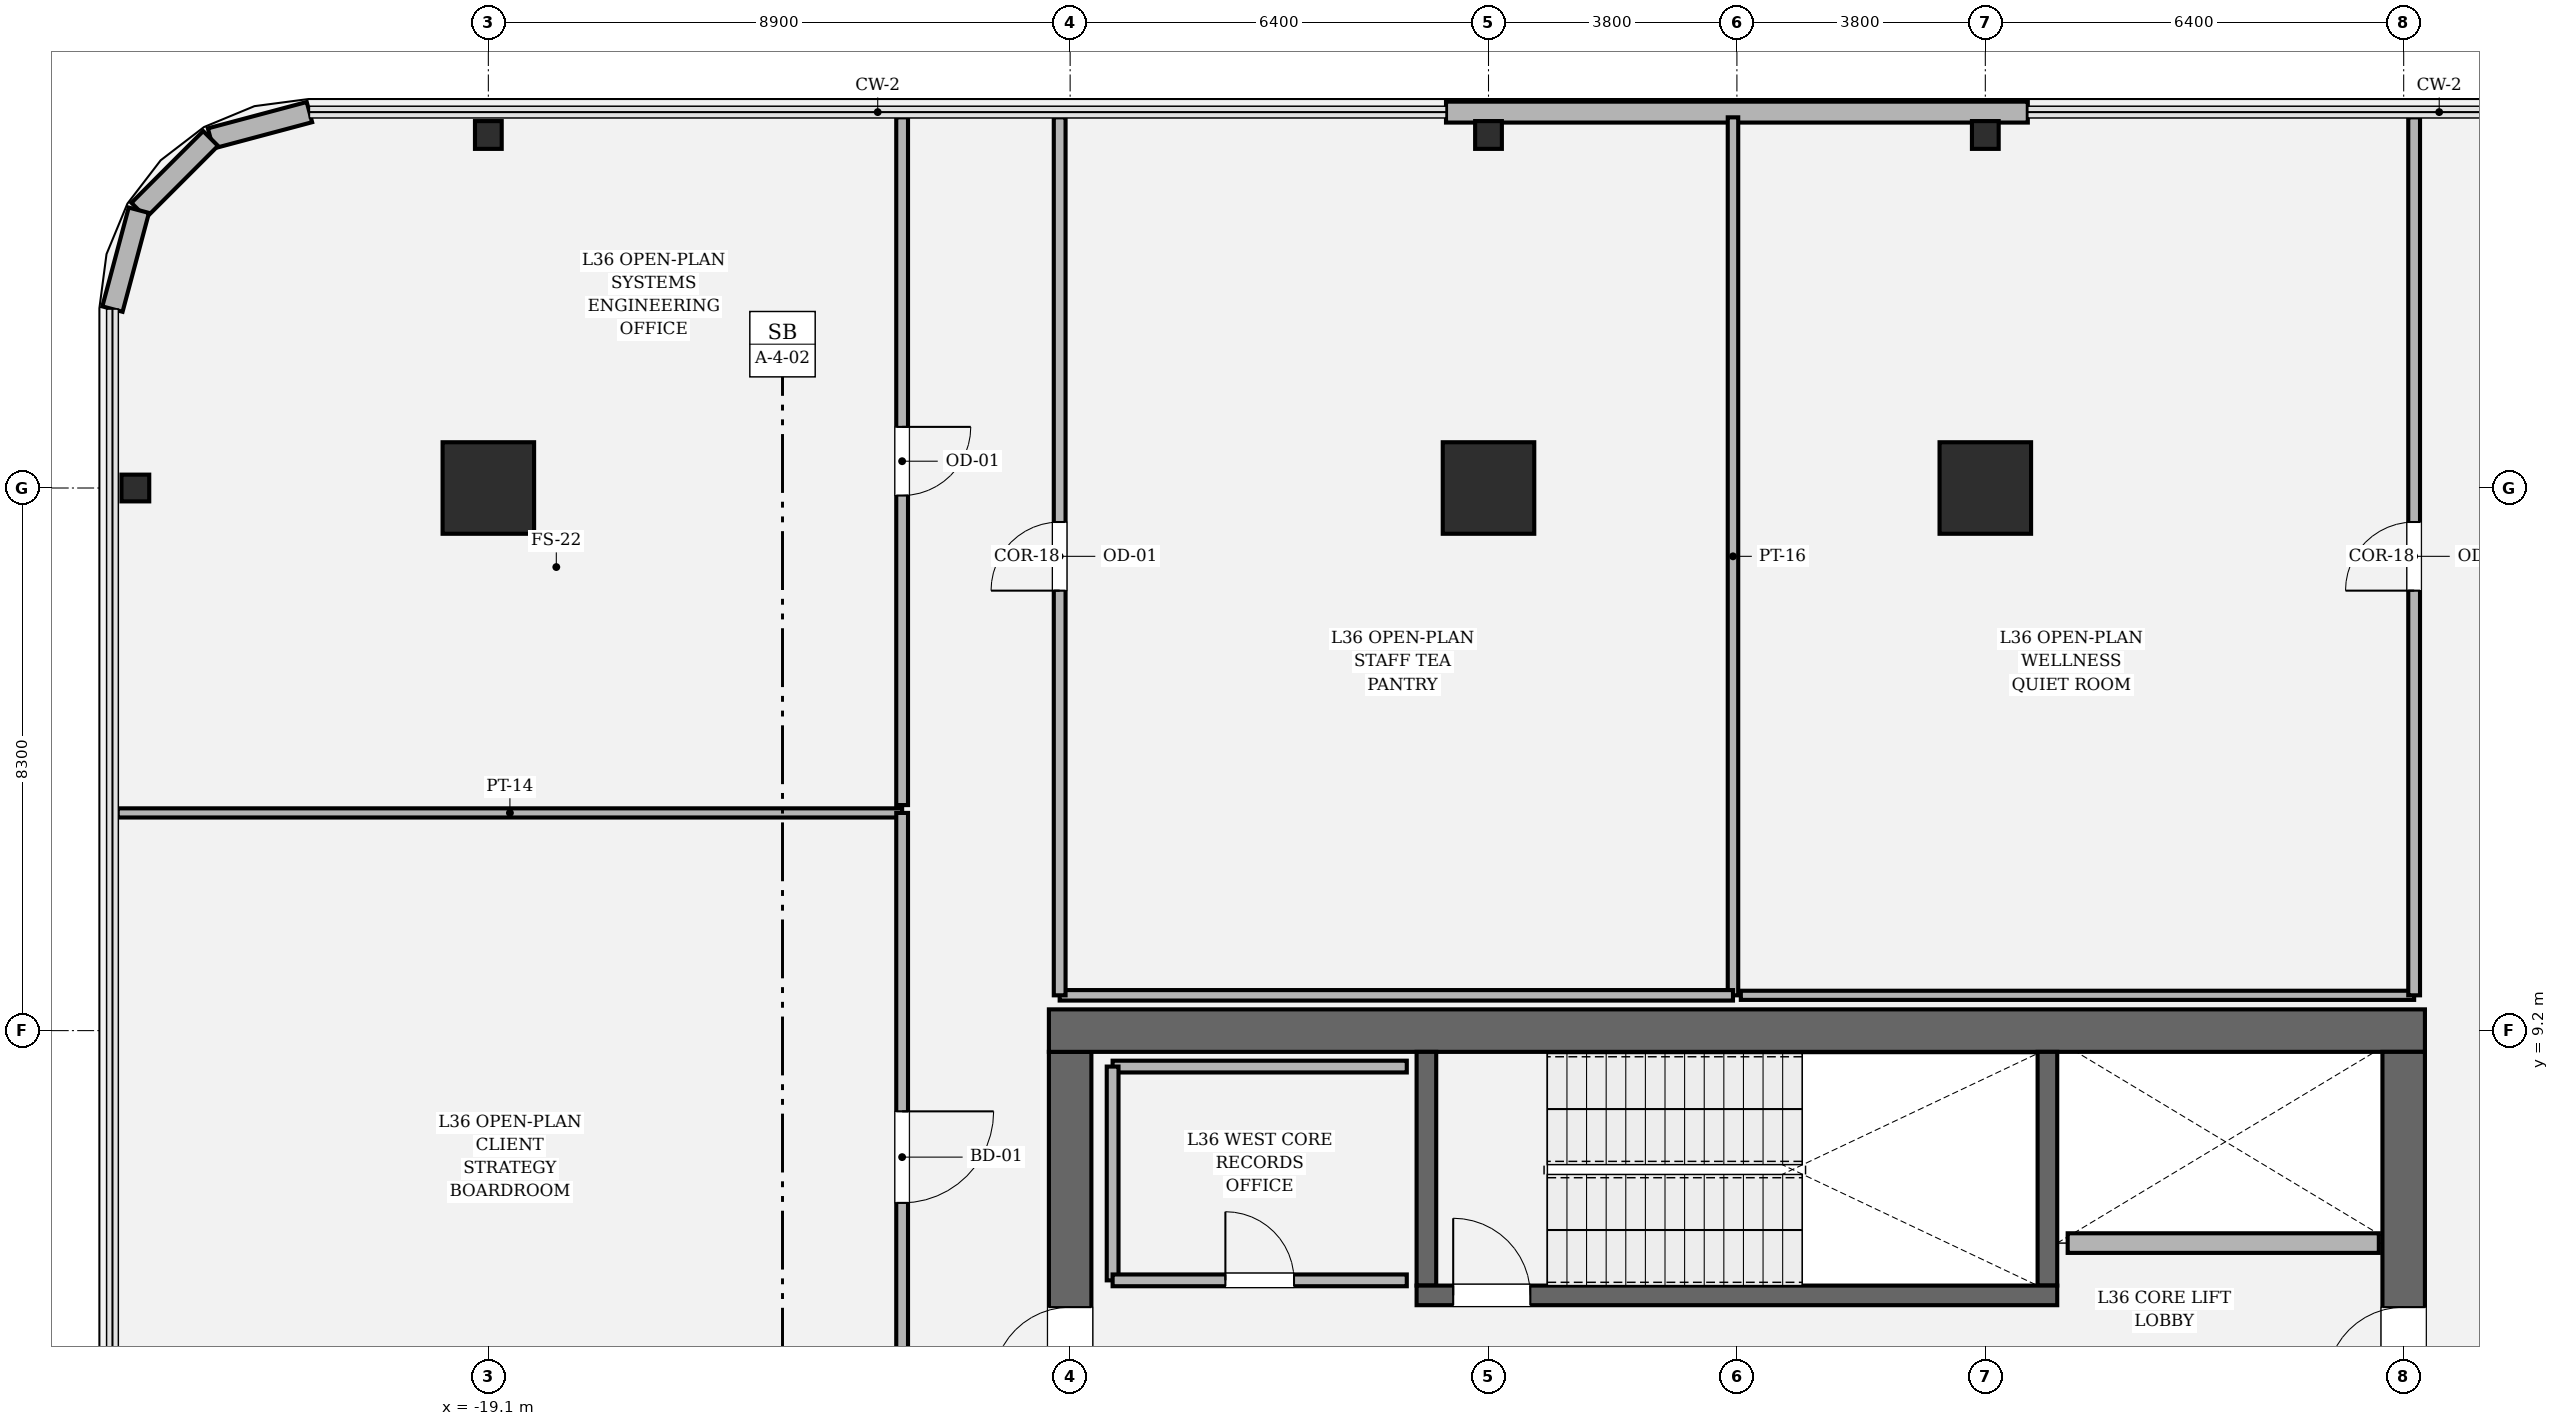
"""IFC4 building model, lengths in metres.
Left out: names, types, materials, properties, quantities, classifications, styles, units other than length and angle.
Written with IfcOpenShell. Run it as: python <this file> out.ifc"""

import sys

from ifc_helpers import new_model, si_unit, direction, frame, frame_2d, origin, origin_2d, place, context, subcontext, project, spatial, rectangle, hollow_rectangle, i_section, extrude, element, fill, save


model = new_model("IFC4")
c1 = context("Model", 3, precision=1e-05, world=origin(), true_north=direction((0.0, 1.0)))
c2 = subcontext(c1, "Body", "Model", "MODEL_VIEW")
j1 = project(units=[si_unit("LENGTHUNIT", "METRE"), si_unit("PLANEANGLEUNIT", "RADIAN")], contexts=[c1])
p1 = place(None, origin())
s1 = spatial("IfcSite", under=j1, at=p1, CompositionType="ELEMENT")
p2 = place(p1, origin())
s2 = spatial("IfcBuilding", under=s1, at=p2, CompositionType="ELEMENT")
p3 = place(p2, frame((0.0, 0.0, 156.0)))
s3 = spatial("IfcBuildingStorey", under=s2, at=p3, CompositionType="ELEMENT", Elevation=156.0)
p4 = place(p3, frame((-10.2, -8.875, 0.0), z_axis=(0.0, 0.0, 1.0), x_axis=(0.0, 1.0, 0.0)))
e1 = element("IfcWall", 1, at=p4, inside=s3, PredefinedType="SHEAR", context=c2, shape_type="SweptSolid", body=[
    extrude(rectangle(XDim=17.75, YDim=0.65, at=frame_2d((8.875, 0.0))), origin(), (0.0, 0.0, 1.0), 4.05),
])
p5 = place(p4, frame((12.665, 0.0, 0.0)))
e2 = element("IfcOpeningElement", 2, at=p5, cuts=e1, PredefinedType="OPENING", context=c2, shape_type="SweptSolid", body=[
    extrude(rectangle(XDim=1.18, YDim=2.2, at=frame_2d((0.59, 1.1))), frame((0.0, 0.335, 0.0), z_axis=(0.0, -1.0, 0.0), x_axis=(1.0, 0.0, 0.0)), (0.0, 0.0, 1.0), 0.67),
])
p6 = place(p3, frame((-10.525, 9.2, 0.0), z_axis=(0.0, 0.0, 1.0), x_axis=(1.0, 0.0, 0.0)))
e3 = element("IfcWall", 3, at=p6, inside=s3, PredefinedType="SHEAR", context=c2, shape_type="SweptSolid", body=[
    extrude(rectangle(XDim=21.05, YDim=0.65, at=frame_2d((10.525, 0.0))), origin(), (0.0, 0.0, 1.0), 4.05),
])
p7 = place(p3, frame((10.2, 8.875, 0.0), z_axis=(0.0, 0.0, 1.0), x_axis=(0.0, -1.0, 0.0)))
e4 = element("IfcWall", 4, at=p7, inside=s3, PredefinedType="SHEAR", context=c2, shape_type="SweptSolid", body=[
    extrude(rectangle(XDim=17.75, YDim=0.65, at=frame_2d((8.875, 0.0))), origin(), (0.0, 0.0, 1.0), 4.05),
])
p8 = place(p7, frame((3.905, 0.0, 0.0)))
e5 = element("IfcOpeningElement", 5, at=p8, cuts=e4, PredefinedType="OPENING", context=c2, shape_type="SweptSolid", body=[
    extrude(rectangle(XDim=1.18, YDim=2.2, at=frame_2d((0.59, 1.1))), frame((0.0, 0.335, 0.0), z_axis=(0.0, -1.0, 0.0), x_axis=(1.0, 0.0, 0.0)), (0.0, 0.0, 1.0), 0.67),
])
for number, where, z_axis, x_axis in (
    (6, (-4.75, 5.3, 0.0), (0.0, 0.0, 1.0), (0.0, 1.0, 0.0)),
    (7, (4.75, 8.875, 0.0), (0.0, 0.0, 1.0), (0.0, -1.0, 0.0)),
):
    element("IfcWall", number, at=place(p3, frame(where, z_axis=z_axis, x_axis=x_axis)), inside=s3, PredefinedType="SOLIDWALL", context=c2, shape_type="SweptSolid", body=[
        extrude(rectangle(XDim=3.575, YDim=0.3, at=frame_2d((1.788, 0.0))), origin(), (0.0, 0.0, 1.0), 4.05),
    ])
p9 = place(p3, frame((-4.9, 5.15, 0.0), z_axis=(0.0, 0.0, 1.0), x_axis=(1.0, 0.0, 0.0)))
e8 = element("IfcWall", 8, at=p9, inside=s3, PredefinedType="SOLIDWALL", context=c2, shape_type="SweptSolid", body=[
    extrude(rectangle(XDim=9.8, YDim=0.3, at=frame_2d((4.9, 0.0))), origin(), (0.0, 0.0, 1.0), 4.05),
])
p10 = place(p9, frame((0.56, 0.0, 0.0)))
e9 = element("IfcOpeningElement", 9, at=p10, cuts=e8, PredefinedType="OPENING", context=c2, shape_type="SweptSolid", body=[
    extrude(rectangle(XDim=1.18, YDim=2.2, at=frame_2d((0.59, 1.1))), frame((0.0, 0.16, 0.0), z_axis=(0.0, -1.0, 0.0), x_axis=(1.0, 0.0, 0.0)), (0.0, 0.0, 1.0), 0.32),
])
for number, where, z_axis, x_axis in (
    (10, (3.8, 17.5, 0.0), (0.0, 0.0, 1.0), (1.0, 0.0, 0.0)),
    (11, (-3.8, 17.5, 0.0), (0.0, 0.0, 1.0), (1.0, 0.0, 0.0)),
    (12, (-19.1, 17.5, 0.0), (0.0, 0.0, 1.0), (1.0, 0.0, 0.0)),
):
    element("IfcColumn", number, at=place(p3, frame(where, z_axis=z_axis, x_axis=x_axis)), inside=s3, PredefinedType="COLUMN", context=c2, shape_type="SweptSolid", body=[
        extrude(hollow_rectangle(XDim=1.4, YDim=1.4, WallThickness=0.042, at=origin_2d()), origin(), (0.0, 0.0, 1.0), 4.05),
    ])
for number, where, z_axis, x_axis in (
    (13, (-19.1, 22.9, 0.0), (0.0, 0.0, 1.0), (1.0, 0.0, 0.0)),
    (14, (-3.8, 22.9, 0.0), (0.0, 0.0, 1.0), (1.0, 0.0, 0.0)),
    (15, (3.8, 22.9, 0.0), (0.0, 0.0, 1.0), (1.0, 0.0, 0.0)),
    (16, (-24.5, 17.5, 0.0), (0.0, 0.0, 1.0), (0.0, 1.0, 0.0)),
):
    element("IfcColumn", number, at=place(p3, frame(where, z_axis=z_axis, x_axis=x_axis)), inside=s3, PredefinedType="COLUMN", context=c2, shape_type="SweptSolid", body=[
        extrude(i_section(OverallWidth=0.409, OverallDepth=0.425, WebThickness=0.032, FlangeThickness=0.052, FilletRadius=0.018, at=origin_2d()), origin(), (0.0, 0.0, 1.0), 4.048),
    ])
p11 = place(p3, frame((4.45, 23.25, 0.0), z_axis=(0.0, 0.0, 1.0), x_axis=(-1.0, 0.0, 0.0)))
e17 = element("IfcWall", 17, at=p11, inside=s3, PredefinedType="SOLIDWALL", context=c2, shape_type="SweptSolid", body=[
    extrude(rectangle(XDim=8.9, YDim=0.32, at=frame_2d((4.45, 0.0))), origin(), (0.0, 0.0, 1.0), 2.544),
])
p12 = place(p3, frame((-21.837, 23.25, 0.0), z_axis=(0.0, 0.0, 1.0), x_axis=(-0.966224582397, -0.257701486942, 0.0)))
e18 = element("IfcWall", 18, at=p12, inside=s3, PredefinedType="SOLIDWALL", context=c2, shape_type="SweptSolid", body=[
    extrude(rectangle(XDim=1.565, YDim=0.32, at=frame_2d((0.783, 0.0))), origin(), (0.0, 0.0, 1.0), 3.83),
])
p13 = place(p3, frame((-23.349, 22.847, 0.0), z_axis=(0.0, 0.0, 1.0), x_axis=(-0.707028130747, -0.707185422879, 0.0)))
e19 = element("IfcWall", 19, at=p13, inside=s3, PredefinedType="SOLIDWALL", context=c2, shape_type="SweptSolid", body=[
    extrude(rectangle(XDim=1.552, YDim=0.32, at=frame_2d((0.776, 0.0))), origin(), (0.0, 0.0, 1.0), 3.83),
])
p14 = place(p3, frame((-24.447, 21.749, 0.0), z_axis=(0.0, 0.0, 1.0), x_axis=(-0.257847112249, -0.966185730957, 0.0)))
e20 = element("IfcWall", 20, at=p14, inside=s3, PredefinedType="SOLIDWALL", context=c2, shape_type="SweptSolid", body=[
    extrude(rectangle(XDim=1.565, YDim=0.32, at=frame_2d((0.783, 0.0))), origin(), (0.0, 0.0, 1.0), 3.83),
])
p15 = place(p3, frame((5.06, 5.95, 0.0), z_axis=(0.0, 0.0, 1.0), x_axis=(1.0, 0.0, 0.0)))
e21 = element("IfcWall", 21, at=p15, inside=s3, PredefinedType="SOLIDWALL", context=c2, shape_type="SweptSolid", body=[
    extrude(rectangle(XDim=4.76, YDim=0.3, at=frame_2d((2.38, 0.0))), origin(), (0.0, 0.0, 1.0), 3.83),
])
p16 = place(p3, frame((-5.05, 8.65, 0.0), z_axis=(0.0, 0.0, 1.0), x_axis=(-1.0, 0.0, 0.0)))
e22 = element("IfcWall", 22, at=p16, inside=s3, PredefinedType="PARTITIONING", context=c2, shape_type="SweptSolid", body=[
    extrude(rectangle(XDim=4.5, YDim=0.18, at=frame_2d((2.25, 0.0))), origin(), (0.0, 0.0, 1.0), 3.83),
])
p17 = place(p3, frame((-9.55, 8.65, 0.0), z_axis=(0.0, 0.0, 1.0), x_axis=(0.0, -1.0, 0.0)))
e23 = element("IfcWall", 23, at=p17, inside=s3, PredefinedType="PARTITIONING", context=c2, shape_type="SweptSolid", body=[
    extrude(rectangle(XDim=3.27, YDim=0.18, at=frame_2d((1.635, 0.0))), origin(), (0.0, 0.0, 1.0), 3.83),
])
p18 = place(p3, frame((-9.55, 5.38, 0.0), z_axis=(0.0, 0.0, 1.0), x_axis=(1.0, 0.0, 0.0)))
e24 = element("IfcWall", 24, at=p18, inside=s3, PredefinedType="PARTITIONING", context=c2, shape_type="SweptSolid", body=[
    extrude(rectangle(XDim=4.5, YDim=0.18, at=frame_2d((2.25, 0.0))), origin(), (0.0, 0.0, 1.0), 3.83),
])
p19 = place(p18, frame((1.725, 0.0, 0.0)))
e25 = element("IfcOpeningElement", 25, at=p19, cuts=e24, PredefinedType="OPENING", context=c2, shape_type="SweptSolid", body=[
    extrude(rectangle(XDim=1.05, YDim=2.2, at=frame_2d((0.525, 1.1))), frame((0.0, 0.1, 0.0), z_axis=(0.0, -1.0, 0.0), x_axis=(1.0, 0.0, 0.0)), (0.0, 0.0, 1.0), 0.2),
])
p20 = place(p3, frame((-24.77, 12.53, 0.0), z_axis=(0.0, 0.0, 1.0), x_axis=(1.0, 0.0, 0.0)))
e26 = element("IfcWall", 26, at=p20, inside=s3, PredefinedType="PARTITIONING", context=c2, shape_type="SweptSolid", body=[
    extrude(rectangle(XDim=12.0, YDim=0.14, at=frame_2d((6.0, 0.0))), origin(), (0.0, 0.0, 1.0), 2.544),
])
p21 = place(p3, frame((-12.77, 12.53, 0.0), z_axis=(0.0, 0.0, 1.0), x_axis=(0.0, -1.0, 0.0)))
e27 = element("IfcWall", 27, at=p21, inside=s3, PredefinedType="PARTITIONING", context=c2, shape_type="SweptSolid", body=[
    extrude(rectangle(XDim=10.53, YDim=0.18, at=frame_2d((5.265, 0.0))), origin(), (0.0, 0.0, 1.0), 3.174),
])
p22 = place(p21, frame((4.565, 0.0, 0.0)))
e28 = element("IfcOpeningElement", 28, at=p22, cuts=e27, PredefinedType="OPENING", context=c2, shape_type="SweptSolid", body=[
    extrude(rectangle(XDim=1.4, YDim=2.25, at=frame_2d((0.7, 1.125))), frame((0.0, 0.1, 0.0), z_axis=(0.0, -1.0, 0.0), x_axis=(1.0, 0.0, 0.0)), (0.0, 0.0, 1.0), 0.2),
])
p23 = place(p3, frame((-0.06, 23.17, 0.0), z_axis=(0.0, 0.0, 1.0), x_axis=(0.0, -1.0, 0.0)))
e29 = element("IfcWall", 29, at=p23, inside=s3, PredefinedType="PARTITIONING", context=c2, shape_type="SweptSolid", body=[
    extrude(rectangle(XDim=13.43, YDim=0.16, at=frame_2d((6.715, 0.0))), origin(), (0.0, 0.0, 1.0), 2.544),
])
p24 = place(p3, frame((-0.06, 9.74, 0.0), z_axis=(0.0, 0.0, 1.0), x_axis=(-1.0, 0.0, 0.0)))
e30 = element("IfcWall", 30, at=p24, inside=s3, PredefinedType="PARTITIONING", context=c2, shape_type="SweptSolid", body=[
    extrude(rectangle(XDim=10.3, YDim=0.16, at=frame_2d((5.15, 0.0))), origin(), (0.0, 0.0, 1.0), 3.174),
])
p25 = place(p3, frame((-10.36, 9.74, 0.0), z_axis=(0.0, 0.0, 1.0), x_axis=(0.0, 1.0, 0.0)))
e31 = element("IfcWall", 31, at=p25, inside=s3, PredefinedType="PARTITIONING", context=c2, shape_type="SweptSolid", body=[
    extrude(rectangle(XDim=13.43, YDim=0.18, at=frame_2d((6.715, 0.0))), origin(), (0.0, 0.0, 1.0), 2.544),
])
p26 = place(p25, frame((6.19, 0.0, 0.0)))
e32 = element("IfcOpeningElement", 32, at=p26, cuts=e31, PredefinedType="OPENING", context=c2, shape_type="SweptSolid", body=[
    extrude(rectangle(XDim=1.05, YDim=2.2, at=frame_2d((0.525, 1.1))), frame((0.0, 0.1, 0.0), z_axis=(0.0, -1.0, 0.0), x_axis=(1.0, 0.0, 0.0)), (0.0, 0.0, 1.0), 0.2),
])
p27 = place(p3, frame((10.36, 9.74, 0.0), z_axis=(0.0, 0.0, 1.0), x_axis=(-1.0, 0.0, 0.0)))
e33 = element("IfcWall", 33, at=p27, inside=s3, PredefinedType="PARTITIONING", context=c2, shape_type="SweptSolid", body=[
    extrude(rectangle(XDim=10.3, YDim=0.14, at=frame_2d((5.15, 0.0))), origin(), (0.0, 0.0, 1.0), 3.174),
])
p28 = place(p3, frame((10.36, 23.17, 0.0), z_axis=(0.0, 0.0, 1.0), x_axis=(0.0, -1.0, 0.0)))
e34 = element("IfcWall", 34, at=p28, inside=s3, PredefinedType="PARTITIONING", context=c2, shape_type="SweptSolid", body=[
    extrude(rectangle(XDim=13.43, YDim=0.18, at=frame_2d((6.715, 0.0))), origin(), (0.0, 0.0, 1.0), 2.544),
])
p29 = place(p28, frame((6.19, 0.0, 0.0)))
e35 = element("IfcOpeningElement", 35, at=p29, cuts=e34, PredefinedType="OPENING", context=c2, shape_type="SweptSolid", body=[
    extrude(rectangle(XDim=1.05, YDim=2.2, at=frame_2d((0.525, 1.1))), frame((0.0, 0.1, 0.0), z_axis=(0.0, -1.0, 0.0), x_axis=(1.0, 0.0, 0.0)), (0.0, 0.0, 1.0), 0.2),
])
p30 = place(p3, frame((-12.77, 23.17, 0.0), z_axis=(0.0, 0.0, 1.0), x_axis=(0.0, -1.0, 0.0)))
e36 = element("IfcWall", 36, at=p30, inside=s3, PredefinedType="PARTITIONING", context=c2, shape_type="SweptSolid", body=[
    extrude(rectangle(XDim=10.52, YDim=0.18, at=frame_2d((5.26, 0.0))), origin(), (0.0, 0.0, 1.0), 2.544),
])
p31 = place(p30, frame((4.735, 0.0, 0.0)))
e37 = element("IfcOpeningElement", 37, at=p31, cuts=e36, PredefinedType="OPENING", context=c2, shape_type="SweptSolid", body=[
    extrude(rectangle(XDim=1.05, YDim=2.2, at=frame_2d((0.525, 1.1))), frame((0.0, 0.1, 0.0), z_axis=(0.0, -1.0, 0.0), x_axis=(1.0, 0.0, 0.0)), (0.0, 0.0, 1.0), 0.2),
])
p32 = place(p10, origin())
e38 = element("IfcDoor", 38, at=p32, inside=s3, OperationType="SINGLE_SWING_LEFT", PredefinedType="DOOR", context=c2, shape_type="SweptSolid", body=[
    extrude(rectangle(XDim=1.18, YDim=2.2, at=frame_2d((0.59, 1.1))), frame((0.0, 0.025, 0.0), z_axis=(0.0, -1.0, 0.0), x_axis=(1.0, 0.0, 0.0)), (0.0, 0.0, 1.0), 0.05),
])
fill(e9, e38)
p33 = place(p5, origin())
e39 = element("IfcDoor", 39, at=p33, inside=s3, OperationType="SINGLE_SWING_LEFT", PredefinedType="DOOR", context=c2, shape_type="SweptSolid", body=[
    extrude(rectangle(XDim=1.18, YDim=2.2, at=frame_2d((0.59, 1.1))), frame((0.0, 0.025, 0.0), z_axis=(0.0, -1.0, 0.0), x_axis=(1.0, 0.0, 0.0)), (0.0, 0.0, 1.0), 0.05),
])
fill(e2, e39)
p34 = place(p8, origin())
e40 = element("IfcDoor", 40, at=p34, inside=s3, OperationType="SINGLE_SWING_RIGHT", PredefinedType="DOOR", context=c2, shape_type="SweptSolid", body=[
    extrude(rectangle(XDim=1.18, YDim=2.2, at=frame_2d((0.59, 1.1))), frame((0.0, 0.025, 0.0), z_axis=(0.0, -1.0, 0.0), x_axis=(1.0, 0.0, 0.0)), (0.0, 0.0, 1.0), 0.05),
])
fill(e5, e40)
p35 = place(p19, origin())
e41 = element("IfcDoor", 41, at=p35, inside=s3, OperationType="SINGLE_SWING_LEFT", PredefinedType="DOOR", context=c2, shape_type="SweptSolid", body=[
    extrude(rectangle(XDim=1.05, YDim=2.2, at=frame_2d((0.525, 1.1))), frame((0.0, 0.025, 0.0), z_axis=(0.0, -1.0, 0.0), x_axis=(1.0, 0.0, 0.0)), (0.0, 0.0, 1.0), 0.05),
])
fill(e25, e41)
p36 = place(p22, origin())
e42 = element("IfcDoor", 42, at=p36, inside=s3, OperationType="SINGLE_SWING_LEFT", PredefinedType="DOOR", context=c2, shape_type="SweptSolid", body=[
    extrude(rectangle(XDim=1.4, YDim=2.25, at=frame_2d((0.7, 1.125))), frame((0.0, 0.025, 0.0), z_axis=(0.0, -1.0, 0.0), x_axis=(1.0, 0.0, 0.0)), (0.0, 0.0, 1.0), 0.05),
])
fill(e28, e42)
p37 = place(p26, origin())
e43 = element("IfcDoor", 43, at=p37, inside=s3, OperationType="SINGLE_SWING_LEFT", PredefinedType="DOOR", context=c2, shape_type="SweptSolid", body=[
    extrude(rectangle(XDim=1.05, YDim=2.2, at=frame_2d((0.525, 1.1))), frame((0.0, 0.025, 0.0), z_axis=(0.0, -1.0, 0.0), x_axis=(1.0, 0.0, 0.0)), (0.0, 0.0, 1.0), 0.05),
])
fill(e32, e43)
p38 = place(p29, origin())
e44 = element("IfcDoor", 44, at=p38, inside=s3, OperationType="SINGLE_SWING_RIGHT", PredefinedType="DOOR", context=c2, shape_type="SweptSolid", body=[
    extrude(rectangle(XDim=1.05, YDim=2.2, at=frame_2d((0.525, 1.1))), frame((0.0, 0.025, 0.0), z_axis=(0.0, -1.0, 0.0), x_axis=(1.0, 0.0, 0.0)), (0.0, 0.0, 1.0), 0.05),
])
fill(e35, e44)
p39 = place(p31, origin())
e45 = element("IfcDoor", 45, at=p39, inside=s3, OperationType="SINGLE_SWING_LEFT", PredefinedType="DOOR", context=c2, shape_type="SweptSolid", body=[
    extrude(rectangle(XDim=1.05, YDim=2.2, at=frame_2d((0.525, 1.1))), frame((0.0, 0.025, 0.0), z_axis=(0.0, -1.0, 0.0), x_axis=(1.0, 0.0, 0.0)), (0.0, 0.0, 1.0), 0.05),
])
fill(e37, e45)
save(model, sys.argv[1])
